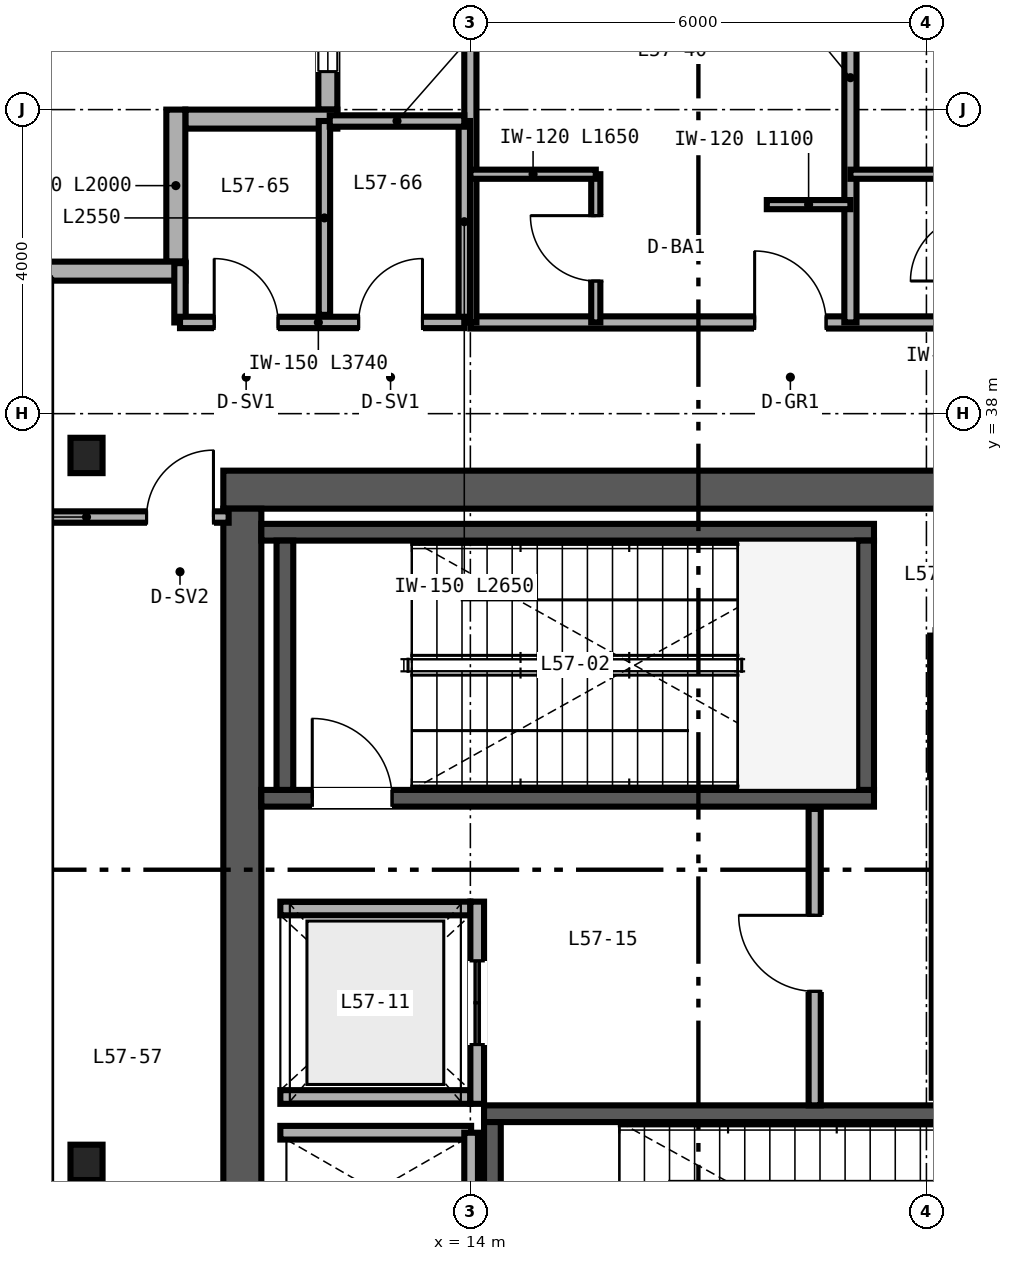
"""IFC4 building model, lengths in metres.
Left out: names, types, materials, properties, quantities, classifications, styles, units other than length and angle.
Written with IfcOpenShell. Run it as: python <this file> out.ifc"""

import sys

from ifc_helpers import new_model, si_unit, direction, frame, frame_2d, origin, origin_2d, place, context, subcontext, project, spatial, rectangle, i_section, extrude, source, transform, mapped, element, fill, save


model = new_model("IFC4")
c1 = context("Model", 3, precision=1e-05, world=origin(), true_north=direction((0.0, 1.0)))
c2 = subcontext(c1, "Body", "Model", "MODEL_VIEW")
j1 = project(units=[si_unit("LENGTHUNIT", "METRE"), si_unit("PLANEANGLEUNIT", "RADIAN")], contexts=[c1])
p1 = place(None, origin())
s1 = spatial("IfcSite", under=j1, at=p1, CompositionType="ELEMENT")
p2 = place(p1, origin())
s2 = spatial("IfcBuilding", under=s1, at=p2, CompositionType="ELEMENT")
p3 = place(p2, frame((0.0, 0.0, 228.0)))
s3 = spatial("IfcBuildingStorey", under=s2, at=p3, CompositionType="ELEMENT", Elevation=228.0)
p4 = place(p3, frame((10.75, 37.0, 0.0), z_axis=(0.0, 0.0, 1.0), x_axis=(1.0, 0.0, 0.0)))
e1 = element("IfcWall", 1, at=p4, inside=s3, PredefinedType="SHEAR", context=c2, shape_type="SweptSolid", body=[
    extrude(rectangle(XDim=12.5, YDim=0.5, at=frame_2d((6.25, 0.0))), origin(), (0.0, 0.0, 1.0), 4.58),
])
p5 = place(p4, frame((10.35, 0.0, 0.0)))
e2 = element("IfcOpeningElement", 2, at=p5, cuts=e1, PredefinedType="OPENING", context=c2, shape_type="SweptSolid", body=[
    extrude(rectangle(XDim=1.0, YDim=2.15, at=frame_2d((0.5, 1.075))), frame((0.0, 0.26, 0.0), z_axis=(0.0, -1.0, 0.0), x_axis=(1.0, 0.0, 0.0)), (0.0, 0.0, 1.0), 0.52),
])
p6 = place(p3, frame((11.0, 15.25, 0.0), z_axis=(0.0, 0.0, 1.0), x_axis=(0.0, 1.0, 0.0)))
e3 = element("IfcWall", 3, at=p6, inside=s3, PredefinedType="SHEAR", context=c2, shape_type="SweptSolid", body=[
    extrude(rectangle(XDim=21.5, YDim=0.5, at=frame_2d((10.75, 0.0))), origin(), (0.0, 0.0, 1.0), 4.58),
])
p7 = place(p3, frame((11.25, 32.94, 0.0), z_axis=(0.0, 0.0, 1.0), x_axis=(1.0, 0.0, 0.0)))
e4 = element("IfcWall", 4, at=p7, inside=s3, PredefinedType="SHEAR", context=c2, shape_type="SweptSolid", body=[
    extrude(rectangle(XDim=8.06, YDim=0.22, at=frame_2d((4.03, 0.0))), origin(), (0.0, 0.0, 1.0), 4.6),
])
p8 = place(p7, frame((0.67, 0.0, 0.0)))
e5 = element("IfcOpeningElement", 5, at=p8, cuts=e4, PredefinedType="OPENING", context=c2, shape_type="SweptSolid", body=[
    extrude(rectangle(XDim=1.05, YDim=2.15, at=frame_2d((0.525, 1.075))), frame((0.0, 0.12, 0.0), z_axis=(0.0, -1.0, 0.0), x_axis=(1.0, 0.0, 0.0)), (0.0, 0.0, 1.0), 0.24),
])
p9 = place(p3, frame((11.25, 36.44, 0.0), z_axis=(0.0, 0.0, 1.0), x_axis=(1.0, 0.0, 0.0)))
e6 = element("IfcWall", 6, at=p9, inside=s3, PredefinedType="SHEAR", context=c2, shape_type="SweptSolid", body=[
    extrude(rectangle(XDim=8.06, YDim=0.22, at=frame_2d((4.03, 0.0))), origin(), (0.0, 0.0, 1.0), 4.6),
])
for number, where, z_axis, x_axis in (
    (7, (11.56, 33.05, 0.0), (0.0, 0.0, 1.0), (0.0, 1.0, 0.0)),
    (8, (19.2, 33.05, 0.0), (0.0, 0.0, 1.0), (0.0, 1.0, 0.0)),
):
    element("IfcWall", number, at=place(p3, frame(where, z_axis=z_axis, x_axis=x_axis)), inside=s3, PredefinedType="SHEAR", context=c2, shape_type="SweptSolid", body=[
        extrude(rectangle(XDim=3.28, YDim=0.22, at=frame_2d((1.64, 0.0))), origin(), (0.0, 0.0, 1.0), 4.6),
    ])
p10 = place(p3, frame((14.18, 28.79, 0.0), z_axis=(0.0, 0.0, 1.0), x_axis=(1.0, 0.0, 0.0)))
e9 = element("IfcWall", 9, at=p10, inside=s3, PredefinedType="SHEAR", context=c2, shape_type="SweptSolid", body=[
    extrude(rectangle(XDim=8.57, YDim=0.22, at=frame_2d((4.285, 0.0))), origin(), (0.0, 0.0, 1.0), 4.6),
])
p11 = place(p3, frame((14.29, 25.4, 0.0), z_axis=(0.0, 0.0, 1.0), x_axis=(0.0, 1.0, 0.0)))
e10 = element("IfcWall", 10, at=p11, inside=s3, PredefinedType="SHEAR", context=c2, shape_type="SweptSolid", body=[
    extrude(rectangle(XDim=3.28, YDim=0.22, at=frame_2d((1.64, 0.0))), origin(), (0.0, 0.0, 1.0), 4.6),
])
m1 = source(origin(), c2, "Body", "SweptSolid", [
    extrude(i_section(OverallWidth=0.422, OverallDepth=0.465, WebThickness=0.045, FlangeThickness=0.073, FilletRadius=0.025, at=origin_2d()), origin(), (0.0, 0.0, 1.0), 4.58),
])
for number, where, z_axis, x_axis in (
    (11, (8.95, 28.15, 0.0), (0.0, 0.0, 1.0), (1.0, 0.0, 0.0)),
    (12, (8.95, 37.45, 0.0), (0.0, 0.0, 1.0), (1.0, 0.0, 0.0)),
):
    element("IfcColumn", number, at=place(p3, frame(where, z_axis=z_axis, x_axis=x_axis)), inside=s3, PredefinedType="COLUMN", context=c2, shape_type="MappedRepresentation", body=[
        mapped(m1, transform((0.0, 0.0, 0.0), scale=1.0)),
    ])
p12 = place(p3, frame((12.125, 44.0, 0.0), z_axis=(0.0, 0.0, 1.0), x_axis=(0.0, -1.0, 0.0)))
e13 = element("IfcWall", 13, at=p12, inside=s3, PredefinedType="SOLIDWALL", context=c2, shape_type="SweptSolid", body=[
    extrude(rectangle(XDim=2.0, YDim=0.25, at=frame_2d((1.0, 0.0))), origin(), (0.0, 0.0, 1.0), 4.58),
])
p13 = place(p12, frame((0.5, 0.0, 0.85)))
e14 = element("IfcOpeningElement", 14, at=p13, cuts=e13, PredefinedType="OPENING", context=c2, shape_type="SweptSolid", body=[
    extrude(rectangle(XDim=1.0, YDim=1.9, at=frame_2d((0.5, 0.95))), frame((0.0, 0.135, 0.0), z_axis=(0.0, -1.0, 0.0), x_axis=(1.0, 0.0, 0.0)), (0.0, 0.0, 1.0), 0.27),
])
for number, where, z_axis, x_axis in (
    (15, (12.25, 41.875, 0.0), (0.0, 0.0, 1.0), (-1.0, 0.0, 0.0)),
    (16, (10.125, 42.0, 0.0), (0.0, 0.0, 1.0), (0.0, -1.0, 0.0)),
):
    element("IfcWall", number, at=place(p3, frame(where, z_axis=z_axis, x_axis=x_axis)), inside=s3, PredefinedType="SOLIDWALL", context=c2, shape_type="SweptSolid", body=[
        extrude(rectangle(XDim=2.0, YDim=0.25, at=frame_2d((1.0, 0.0))), origin(), (0.0, 0.0, 1.0), 4.58),
    ])
p14 = place(p3, frame((10.25, 39.875, 0.0), z_axis=(0.0, 0.0, 1.0), x_axis=(-1.0, 0.0, 0.0)))
e17 = element("IfcWall", 17, at=p14, inside=s3, PredefinedType="SOLIDWALL", context=c2, shape_type="SweptSolid", body=[
    extrude(rectangle(XDim=2.25, YDim=0.25, at=frame_2d((1.125, 0.0))), origin(), (0.0, 0.0, 1.0), 4.58),
])
p15 = place(p3, frame((20.16, 29.0, 0.0), z_axis=(0.0, 0.0, 1.0), x_axis=(0.0, 1.0, 0.0)))
e18 = element("IfcWall", 18, at=p15, inside=s3, PredefinedType="SOLIDWALL", context=c2, shape_type="SweptSolid", body=[
    extrude(rectangle(XDim=4.29, YDim=0.18, at=frame_2d((2.145, 0.0))), origin(), (0.0, 0.0, 1.0), 4.58),
])
for number, where, z_axis, x_axis in (
    (19, (11.5, 29.01, 0.0), (0.0, 0.0, 1.0), (1.0, 0.0, 0.0)),
    (20, (11.5, 31.49, 0.0), (0.0, 0.0, 1.0), (1.0, 0.0, 0.0)),
):
    element("IfcWall", number, at=place(p3, frame(where, z_axis=z_axis, x_axis=x_axis)), inside=s3, PredefinedType="SOLIDWALL", context=c2, shape_type="SweptSolid", body=[
        extrude(rectangle(XDim=2.5, YDim=0.18, at=frame_2d((1.25, 0.0))), origin(), (0.0, 0.0, 1.0), 4.58),
    ])
p16 = place(p3, frame((14.09, 28.92, 0.0), z_axis=(0.0, 0.0, 1.0), x_axis=(0.0, 1.0, 0.0)))
e21 = element("IfcWall", 21, at=p16, inside=s3, PredefinedType="SOLIDWALL", context=c2, shape_type="SweptSolid", body=[
    extrude(rectangle(XDim=2.66, YDim=0.18, at=frame_2d((1.33, 0.0))), origin(), (0.0, 0.0, 1.0), 4.58),
])
p17 = place(p16, frame((0.78, 0.0, 0.0)))
e22 = element("IfcOpeningElement", 22, at=p17, cuts=e21, PredefinedType="OPENING", context=c2, shape_type="SweptSolid", body=[
    extrude(rectangle(XDim=1.1, YDim=2.2, at=frame_2d((0.55, 1.1))), frame((0.0, 0.1, 0.0), z_axis=(0.0, -1.0, 0.0), x_axis=(1.0, 0.0, 0.0)), (0.0, 0.0, 1.0), 0.2),
])
p18 = place(p3, frame((11.5, 28.54, 0.0), z_axis=(0.0, 0.0, 1.0), x_axis=(1.0, 0.0, 0.0)))
e23 = element("IfcWall", 23, at=p18, inside=s3, PredefinedType="SOLIDWALL", context=c2, shape_type="SweptSolid", body=[
    extrude(rectangle(XDim=2.51, YDim=0.18, at=frame_2d((1.255, 0.0))), origin(), (0.0, 0.0, 1.0), 4.58),
])
p19 = place(p3, frame((14.01, 25.46, 0.0), z_axis=(0.0, 0.0, 1.0), x_axis=(0.0, 1.0, 0.0)))
e24 = element("IfcWall", 24, at=p19, inside=s3, PredefinedType="SOLIDWALL", context=c2, shape_type="SweptSolid", body=[
    extrude(rectangle(XDim=3.08, YDim=0.18, at=frame_2d((1.54, 0.0))), origin(), (0.0, 0.0, 1.0), 4.58),
])
p20 = place(p3, frame((18.53, 28.9, 0.0), z_axis=(0.0, 0.0, 1.0), x_axis=(0.0, 1.0, 0.0)))
e25 = element("IfcWall", 25, at=p20, inside=s3, PredefinedType="PARTITIONING", context=c2, shape_type="SweptSolid", body=[
    extrude(rectangle(XDim=3.9, YDim=0.16, at=frame_2d((1.95, 0.0))), origin(), (0.0, 0.0, 1.0), 4.58),
])
p21 = place(p20, frame((1.5, 0.0, 0.0)))
e26 = element("IfcOpeningElement", 26, at=p21, cuts=e25, PredefinedType="OPENING", context=c2, shape_type="SweptSolid", body=[
    extrude(rectangle(XDim=1.0, YDim=2.15, at=frame_2d((0.5, 1.075))), frame((0.0, 0.09, 0.0), z_axis=(0.0, -1.0, 0.0), x_axis=(1.0, 0.0, 0.0)), (0.0, 0.0, 1.0), 0.18),
])
p22 = place(p3, frame((20.12, 33.22, 0.0), z_axis=(0.0, 0.0, 1.0), x_axis=(0.0, 1.0, 0.0)))
e27 = element("IfcWall", 27, at=p22, inside=s3, PredefinedType="PARTITIONING", context=c2, shape_type="SweptSolid", body=[
    extrude(rectangle(XDim=1.86, YDim=0.142, at=frame_2d((0.93, 0.0))), origin(), (0.0, 0.0, 1.0), 4.58),
])
p23 = place(p3, frame((14.0, 39.2, 0.0), z_axis=(0.0, 0.0, 1.0), x_axis=(1.0, 0.0, 0.0)))
e28 = element("IfcWall", 28, at=p23, inside=s3, PredefinedType="PARTITIONING", context=c2, shape_type="SweptSolid", body=[
    extrude(rectangle(XDim=36.0, YDim=0.16, at=frame_2d((18.0, 0.0))), origin(), (0.0, 0.0, 1.0), 4.123),
])
p24 = place(p23, frame((3.74, 0.0, 0.0)))
e29 = element("IfcOpeningElement", 29, at=p24, cuts=e28, PredefinedType="OPENING", context=c2, shape_type="SweptSolid", body=[
    extrude(rectangle(XDim=0.94, YDim=2.15, at=frame_2d((0.47, 1.075))), frame((0.0, 0.09, 0.0), z_axis=(0.0, -1.0, 0.0), x_axis=(1.0, 0.0, 0.0)), (0.0, 0.0, 1.0), 0.18),
])
p25 = place(p23, frame((8.74, 0.0, 0.0)))
e30 = element("IfcOpeningElement", 30, at=p25, cuts=e28, PredefinedType="OPENING", context=c2, shape_type="SweptSolid", body=[
    extrude(rectangle(XDim=0.94, YDim=2.15, at=frame_2d((0.47, 1.075))), frame((0.0, 0.09, 0.0), z_axis=(0.0, -1.0, 0.0), x_axis=(1.0, 0.0, 0.0)), (0.0, 0.0, 1.0), 0.18),
])
p26 = place(p23, frame((14.24, 0.0, 0.0)))
e31 = element("IfcOpeningElement", 31, at=p26, cuts=e28, PredefinedType="OPENING", context=c2, shape_type="SweptSolid", body=[
    extrude(rectangle(XDim=0.94, YDim=2.15, at=frame_2d((0.47, 1.075))), frame((0.0, 0.09, 0.0), z_axis=(0.0, -1.0, 0.0), x_axis=(1.0, 0.0, 0.0)), (0.0, 0.0, 1.0), 0.18),
])
p27 = place(p23, frame((19.74, 0.0, 0.0)))
e32 = element("IfcOpeningElement", 32, at=p27, cuts=e28, PredefinedType="OPENING", context=c2, shape_type="SweptSolid", body=[
    extrude(rectangle(XDim=0.94, YDim=2.15, at=frame_2d((0.47, 1.075))), frame((0.0, 0.09, 0.0), z_axis=(0.0, -1.0, 0.0), x_axis=(1.0, 0.0, 0.0)), (0.0, 0.0, 1.0), 0.18),
])
p28 = place(p23, frame((25.24, 0.0, 0.0)))
e33 = element("IfcOpeningElement", 33, at=p28, cuts=e28, PredefinedType="OPENING", context=c2, shape_type="SweptSolid", body=[
    extrude(rectangle(XDim=0.94, YDim=2.15, at=frame_2d((0.47, 1.075))), frame((0.0, 0.09, 0.0), z_axis=(0.0, -1.0, 0.0), x_axis=(1.0, 0.0, 0.0)), (0.0, 0.0, 1.0), 0.18),
])
p29 = place(p23, frame((30.24, 0.0, 0.0)))
e34 = element("IfcOpeningElement", 34, at=p29, cuts=e28, PredefinedType="OPENING", context=c2, shape_type="SweptSolid", body=[
    extrude(rectangle(XDim=0.94, YDim=2.15, at=frame_2d((0.47, 1.075))), frame((0.0, 0.09, 0.0), z_axis=(0.0, -1.0, 0.0), x_axis=(1.0, 0.0, 0.0)), (0.0, 0.0, 1.0), 0.18),
])
p30 = place(p23, frame((34.74, 0.0, 0.0)))
e35 = element("IfcOpeningElement", 35, at=p30, cuts=e28, PredefinedType="OPENING", context=c2, shape_type="SweptSolid", body=[
    extrude(rectangle(XDim=0.94, YDim=2.15, at=frame_2d((0.47, 1.075))), frame((0.0, 0.09, 0.0), z_axis=(0.0, -1.0, 0.0), x_axis=(1.0, 0.0, 0.0)), (0.0, 0.0, 1.0), 0.18),
])
for number, where, z_axis, x_axis in (
    (36, (14.0, 39.2, 0.0), (0.0, 0.0, 1.0), (0.0, 1.0, 0.0)),
    (37, (19.0, 39.2, 0.0), (0.0, 0.0, 1.0), (0.0, 1.0, 0.0)),
):
    element("IfcWall", number, at=place(p3, frame(where, z_axis=z_axis, x_axis=x_axis)), inside=s3, PredefinedType="PARTITIONING", context=c2, shape_type="SweptSolid", body=[
        extrude(rectangle(XDim=6.44, YDim=0.16, at=frame_2d((3.22, 0.0))), origin(), (0.0, 0.0, 1.0), 3.887),
    ])
p31 = place(p3, frame((15.65, 39.2, 0.0), z_axis=(0.0, 0.0, 1.0), x_axis=(0.0, 1.0, 0.0)))
e38 = element("IfcWall", 38, at=p31, inside=s3, PredefinedType="PARTITIONING", context=c2, shape_type="SweptSolid", body=[
    extrude(rectangle(XDim=1.95, YDim=0.12, at=frame_2d((0.975, 0.0))), origin(), (0.0, 0.0, 1.0), 4.58),
])
p32 = place(p31, frame((0.545, 0.0, 0.0)))
e39 = element("IfcOpeningElement", 39, at=p32, cuts=e38, PredefinedType="OPENING", context=c2, shape_type="SweptSolid", body=[
    extrude(rectangle(XDim=0.86, YDim=2.1, at=frame_2d((0.43, 1.05))), frame((0.0, 0.07, 0.0), z_axis=(0.0, -1.0, 0.0), x_axis=(1.0, 0.0, 0.0)), (0.0, 0.0, 1.0), 0.14),
])
p33 = place(p3, frame((14.0, 41.15, 0.0), z_axis=(0.0, 0.0, 1.0), x_axis=(1.0, 0.0, 0.0)))
e40 = element("IfcWall", 40, at=p33, inside=s3, PredefinedType="PARTITIONING", context=c2, shape_type="SweptSolid", body=[
    extrude(rectangle(XDim=1.65, YDim=0.12, at=frame_2d((0.825, 0.0))), origin(), (0.0, 0.0, 1.0), 4.58),
])
p34 = place(p3, frame((17.9, 40.75, 0.0), z_axis=(0.0, 0.0, 1.0), x_axis=(1.0, 0.0, 0.0)))
e41 = element("IfcWall", 41, at=p34, inside=s3, PredefinedType="PARTITIONING", context=c2, shape_type="SweptSolid", body=[
    extrude(rectangle(XDim=1.1, YDim=0.12, at=frame_2d((0.55, 0.0))), origin(), (0.0, 0.0, 1.0), 4.58),
])
p35 = place(p3, frame((19.0, 41.15, 0.0), z_axis=(0.0, 0.0, 1.0), x_axis=(1.0, 0.0, 0.0)))
e42 = element("IfcWall", 42, at=p35, inside=s3, PredefinedType="PARTITIONING", context=c2, shape_type="SweptSolid", body=[
    extrude(rectangle(XDim=1.65, YDim=0.12, at=frame_2d((0.825, 0.0))), origin(), (0.0, 0.0, 1.0), 4.58),
])
p36 = place(p3, frame((8.16, 36.64, 0.0), z_axis=(0.0, 0.0, 1.0), x_axis=(1.0, 0.0, 0.0)))
e43 = element("IfcWall", 43, at=p36, inside=s3, PredefinedType="PARTITIONING", context=c2, shape_type="SweptSolid", body=[
    extrude(rectangle(XDim=2.66, YDim=0.15, at=frame_2d((1.33, 0.0))), origin(), (0.0, 0.0, 1.0), 3.963),
])
p37 = place(p36, frame((1.58, 0.0, 0.0)))
e44 = element("IfcOpeningElement", 44, at=p37, cuts=e43, PredefinedType="OPENING", context=c2, shape_type="SweptSolid", body=[
    extrude(rectangle(XDim=0.88, YDim=2.15, at=frame_2d((0.44, 1.075))), frame((0.0, 0.085, 0.0), z_axis=(0.0, -1.0, 0.0), x_axis=(1.0, 0.0, 0.0)), (0.0, 0.0, 1.0), 0.17),
])
p38 = place(p3, frame((12.08, 39.3, 0.0), z_axis=(0.0, 0.0, 1.0), x_axis=(0.0, 1.0, 0.0)))
e45 = element("IfcWall", 45, at=p38, inside=s3, PredefinedType="PARTITIONING", context=c2, shape_type="SweptSolid", body=[
    extrude(rectangle(XDim=2.55, YDim=0.15, at=frame_2d((1.275, 0.0))), origin(), (0.0, 0.0, 1.0), 4.58),
])
p39 = place(p3, frame((10.18, 39.2, 0.0), z_axis=(0.0, 0.0, 1.0), x_axis=(0.0, 1.0, 0.0)))
e46 = element("IfcWall", 46, at=p39, inside=s3, PredefinedType="PARTITIONING", context=c2, shape_type="SweptSolid", body=[
    extrude(rectangle(XDim=0.78, YDim=0.15, at=frame_2d((0.39, 0.0))), origin(), (0.0, 0.0, 1.0), 4.58),
])
p40 = place(p3, frame((13.92, 39.2, 0.0), z_axis=(0.0, 0.0, 1.0), x_axis=(0.0, 1.0, 0.0)))
e47 = element("IfcWall", 47, at=p40, inside=s3, PredefinedType="PARTITIONING", context=c2, shape_type="SweptSolid", body=[
    extrude(rectangle(XDim=2.65, YDim=0.15, at=frame_2d((1.325, 0.0))), origin(), (0.0, 0.0, 1.0), 4.58),
])
p41 = place(p3, frame((12.15, 41.85, 0.0), z_axis=(0.0, 0.0, 1.0), x_axis=(1.0, 0.0, 0.0)))
e48 = element("IfcWall", 48, at=p41, inside=s3, PredefinedType="PARTITIONING", context=c2, shape_type="SweptSolid", body=[
    extrude(rectangle(XDim=1.77, YDim=0.15, at=frame_2d((0.885, 0.0))), origin(), (0.0, 0.0, 1.0), 4.58),
])
p42 = place(p3, frame((10.18, 39.2, 0.0), z_axis=(0.0, 0.0, 1.0), x_axis=(1.0, 0.0, 0.0)))
e49 = element("IfcWall", 49, at=p42, inside=s3, PredefinedType="PARTITIONING", context=c2, shape_type="SweptSolid", body=[
    extrude(rectangle(XDim=3.74, YDim=0.15, at=frame_2d((1.87, 0.0))), origin(), (0.0, 0.0, 1.0), 4.58),
])
p43 = place(p42, frame((0.45, 0.0, 0.0)))
e50 = element("IfcOpeningElement", 50, at=p43, cuts=e49, PredefinedType="OPENING", context=c2, shape_type="SweptSolid", body=[
    extrude(rectangle(XDim=0.84, YDim=2.1, at=frame_2d((0.42, 1.05))), frame((0.0, 0.085, 0.0), z_axis=(0.0, -1.0, 0.0), x_axis=(1.0, 0.0, 0.0)), (0.0, 0.0, 1.0), 0.17),
])
p44 = place(p42, frame((2.35, 0.0, 0.0)))
e51 = element("IfcOpeningElement", 51, at=p44, cuts=e49, PredefinedType="OPENING", context=c2, shape_type="SweptSolid", body=[
    extrude(rectangle(XDim=0.84, YDim=2.1, at=frame_2d((0.42, 1.05))), frame((0.0, 0.085, 0.0), z_axis=(0.0, -1.0, 0.0), x_axis=(1.0, 0.0, 0.0)), (0.0, 0.0, 1.0), 0.17),
])
m2 = source(origin(), c2, "Body", "SweptSolid", [
    extrude(rectangle(XDim=1.0, YDim=1.9, at=frame_2d((0.5, 0.95))), frame((0.0, 0.03, 0.0), z_axis=(0.0, -1.0, 0.0), x_axis=(1.0, 0.0, 0.0)), (0.0, 0.0, 1.0), 0.06),
])
p45 = place(p13, origin())
e52 = element("IfcWindow", 52, at=p45, inside=s3, PartitioningType="SINGLE_PANEL", PredefinedType="WINDOW", context=c2, shape_type="MappedRepresentation", body=[
    mapped(m2, transform((0.0, 0.0, 0.0), scale=1.0)),
])
fill(e14, e52)
m3 = source(origin(), c2, "Body", "SweptSolid", [
    extrude(rectangle(XDim=1.05, YDim=2.15, at=frame_2d((0.525, 1.075))), frame((0.0, 0.025, 0.0), z_axis=(0.0, -1.0, 0.0), x_axis=(1.0, 0.0, 0.0)), (0.0, 0.0, 1.0), 0.05),
])
p46 = place(p8, origin())
e53 = element("IfcDoor", 53, at=p46, inside=s3, OperationType="SINGLE_SWING_LEFT", PredefinedType="DOOR", context=c2, shape_type="MappedRepresentation", body=[
    mapped(m3, transform((0.0, 0.0, 0.0), scale=1.0)),
])
fill(e5, e53)
m4 = source(origin(), c2, "Body", "SweptSolid", [
    extrude(rectangle(XDim=1.1, YDim=2.2, at=frame_2d((0.55, 1.1))), frame((0.0, 0.025, 0.0), z_axis=(0.0, -1.0, 0.0), x_axis=(1.0, 0.0, 0.0)), (0.0, 0.0, 1.0), 0.05),
])
p47 = place(p17, origin())
e54 = element("IfcDoor", 54, at=p47, inside=s3, OperationType="DOUBLE_DOOR_SLIDING", PredefinedType="DOOR", context=c2, shape_type="MappedRepresentation", body=[
    mapped(m4, transform((0.0, 0.0, 0.0), scale=1.0)),
])
fill(e22, e54)
m5 = source(origin(), c2, "Body", "SweptSolid", [
    extrude(rectangle(XDim=1.0, YDim=2.15, at=frame_2d((0.5, 1.075))), frame((0.0, 0.025, 0.0), z_axis=(0.0, -1.0, 0.0), x_axis=(1.0, 0.0, 0.0)), (0.0, 0.0, 1.0), 0.05),
])
p48 = place(p21, origin())
e55 = element("IfcDoor", 55, at=p48, inside=s3, OperationType="SINGLE_SWING_RIGHT", PredefinedType="DOOR", context=c2, shape_type="MappedRepresentation", body=[
    mapped(m5, transform((0.0, 0.0, 0.0), scale=1.0)),
])
fill(e26, e55)
m6 = source(origin(), c2, "Body", "SweptSolid", [
    extrude(rectangle(XDim=0.86, YDim=2.1, at=frame_2d((0.43, 1.05))), frame((0.0, 0.025, 0.0), z_axis=(0.0, -1.0, 0.0), x_axis=(1.0, 0.0, 0.0)), (0.0, 0.0, 1.0), 0.05),
])
p49 = place(p32, origin())
e56 = element("IfcDoor", 56, at=p49, inside=s3, OperationType="SINGLE_SWING_RIGHT", PredefinedType="DOOR", context=c2, shape_type="MappedRepresentation", body=[
    mapped(m6, transform((0.0, 0.0, 0.0), scale=1.0)),
])
fill(e39, e56)
m7 = source(origin(), c2, "Body", "SweptSolid", [
    extrude(rectangle(XDim=0.94, YDim=2.15, at=frame_2d((0.47, 1.075))), frame((0.0, 0.025, 0.0), z_axis=(0.0, -1.0, 0.0), x_axis=(1.0, 0.0, 0.0)), (0.0, 0.0, 1.0), 0.05),
])
p50 = place(p24, origin())
e57 = element("IfcDoor", 57, at=p50, inside=s3, OperationType="SINGLE_SWING_LEFT", PredefinedType="DOOR", context=c2, shape_type="MappedRepresentation", body=[
    mapped(m7, transform((0.0, 0.0, 0.0), scale=1.0)),
])
fill(e29, e57)
m8 = source(origin(), c2, "Body", "SweptSolid", [
    extrude(rectangle(XDim=0.88, YDim=2.15, at=frame_2d((0.44, 1.075))), frame((0.0, 0.025, 0.0), z_axis=(0.0, -1.0, 0.0), x_axis=(1.0, 0.0, 0.0)), (0.0, 0.0, 1.0), 0.05),
])
p51 = place(p37, origin())
e58 = element("IfcDoor", 58, at=p51, inside=s3, OperationType="SINGLE_SWING_RIGHT", PredefinedType="DOOR", context=c2, shape_type="MappedRepresentation", body=[
    mapped(m8, transform((0.0, 0.0, 0.0), scale=1.0)),
])
fill(e44, e58)
m9 = source(origin(), c2, "Body", "SweptSolid", [
    extrude(rectangle(XDim=0.84, YDim=2.1, at=frame_2d((0.42, 1.05))), frame((0.0, 0.025, 0.0), z_axis=(0.0, -1.0, 0.0), x_axis=(1.0, 0.0, 0.0)), (0.0, 0.0, 1.0), 0.05),
])
p52 = place(p43, origin())
e59 = element("IfcDoor", 59, at=p52, inside=s3, OperationType="SINGLE_SWING_LEFT", PredefinedType="DOOR", context=c2, shape_type="MappedRepresentation", body=[
    mapped(m9, transform((0.0, 0.0, 0.0), scale=1.0)),
])
fill(e50, e59)
p53 = place(p44, origin())
e60 = element("IfcDoor", 60, at=p53, inside=s3, OperationType="SINGLE_SWING_RIGHT", PredefinedType="DOOR", context=c2, shape_type="MappedRepresentation", body=[
    mapped(m9, transform((0.0, 0.0, 0.0), scale=1.0)),
])
fill(e51, e60)
save(model, sys.argv[1])
